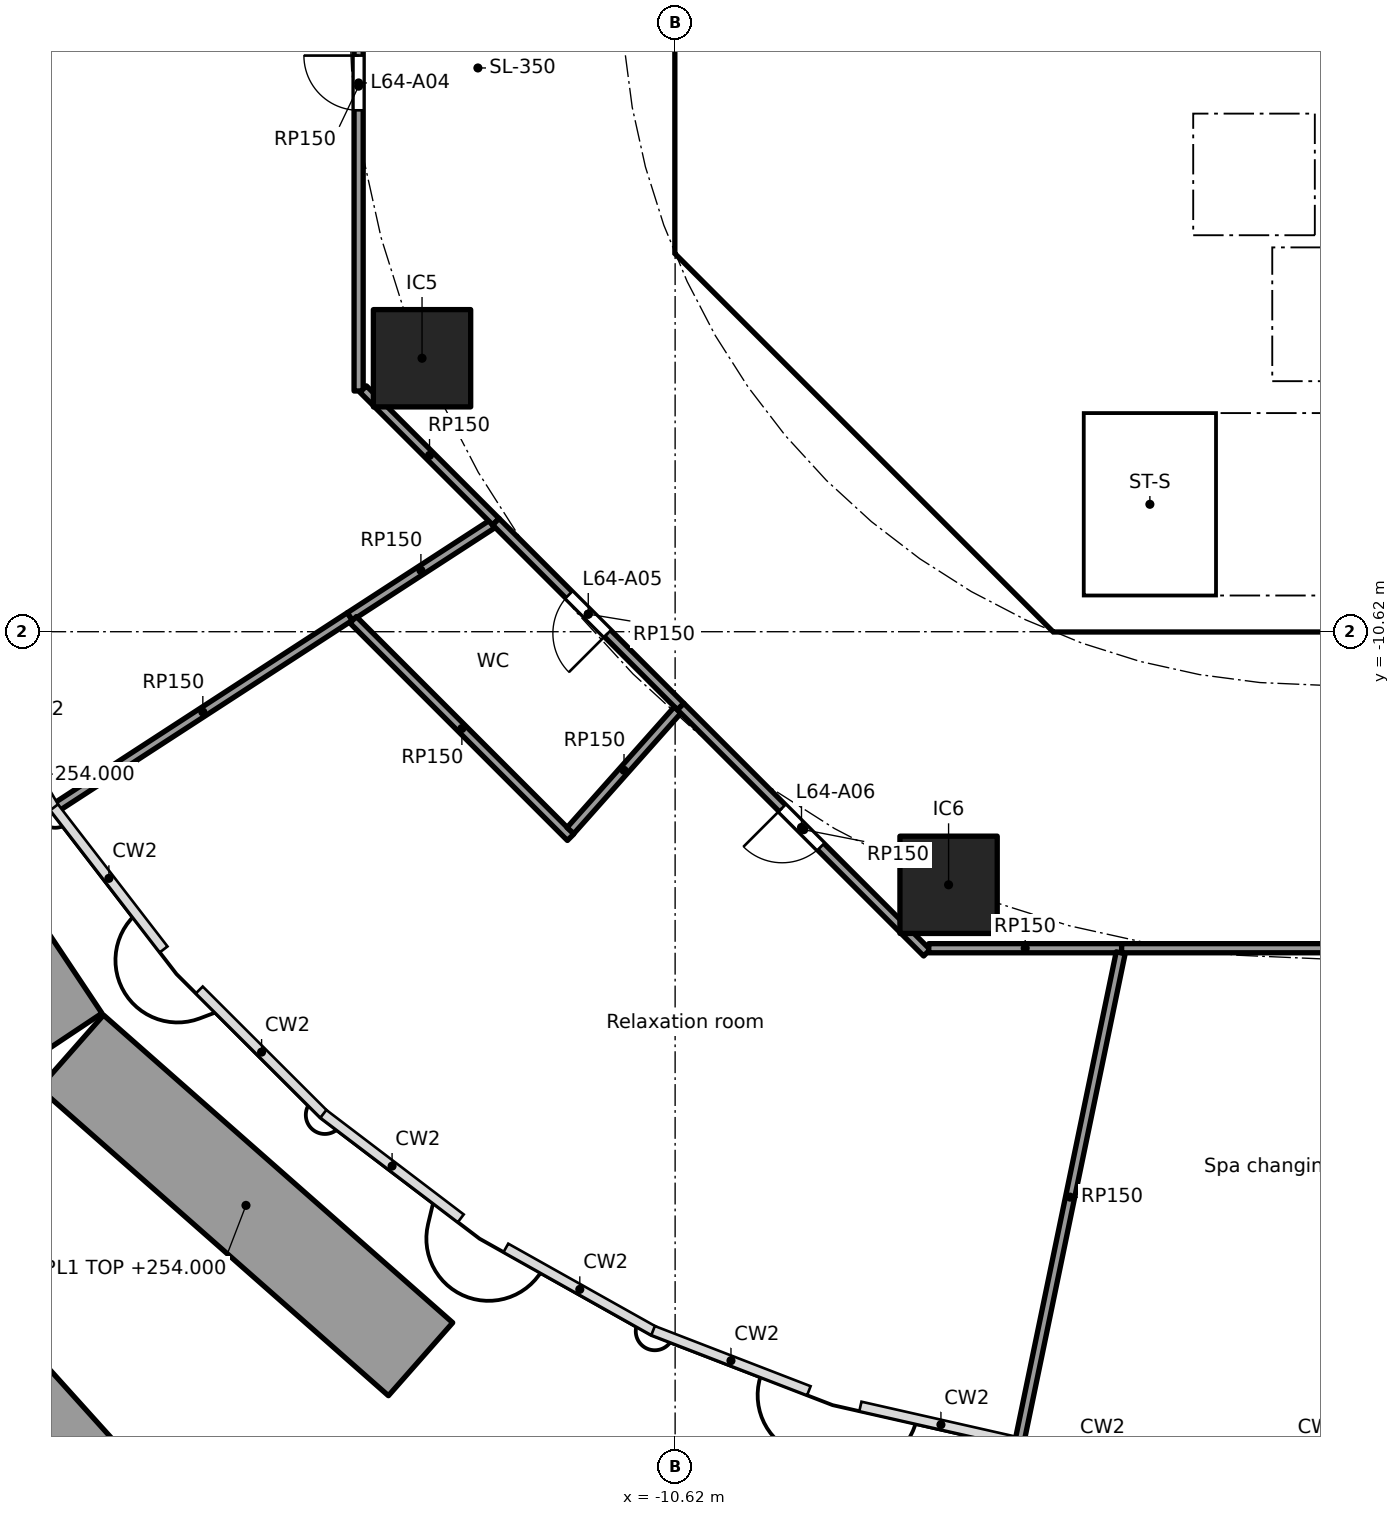
"""IFC4 building model, lengths in metres.
Left out: names, types, materials, properties, quantities, classifications, styles, units other than length and angle.
Written with IfcOpenShell. Run it as: python <this file> out.ifc"""

import sys

from ifc_helpers import new_model, si_unit, direction, frame, frame_2d, origin, origin_2d, place, context, subcontext, project, spatial, polyline, rectangle, outline, extrude, element, fill, save


model = new_model("IFC4")
c1 = context("Model", 3, precision=1e-05, world=origin(), true_north=direction((0.0, 1.0)))
c2 = subcontext(c1, "Body", "Model", "MODEL_VIEW")
j1 = project(units=[si_unit("LENGTHUNIT", "METRE"), si_unit("PLANEANGLEUNIT", "RADIAN")], contexts=[c1])
p1 = place(None, origin())
s1 = spatial("IfcSite", under=j1, at=p1, CompositionType="ELEMENT")
p2 = place(p1, origin())
s2 = spatial("IfcBuilding", under=s1, at=p2, CompositionType="ELEMENT")
p3 = place(p2, frame((0.0, 0.0, 252.9)))
s3 = spatial("IfcBuildingStorey", under=s2, at=p3, CompositionType="ELEMENT", Elevation=252.9)
for number, where, z_axis, x_axis in (
    (1, (-14.782, -6.123, 0.0), (0.0, 0.0, 1.0), (1.0, 0.0, 0.0)),
    (2, (-6.123, -14.782, 0.0), (0.0, 0.0, 1.0), (1.0, 0.0, 0.0)),
):
    element("IfcColumn", number, at=place(p3, frame(where, z_axis=z_axis, x_axis=x_axis)), inside=s3, PredefinedType="COLUMN", context=c2, shape_type="SweptSolid", body=[
        extrude(rectangle(XDim=1.6, YDim=1.6, at=origin_2d()), origin(), (0.0, 0.0, 1.0), 5.6),
    ])
p4 = place(p3, frame((-24.432, -11.757, 0.0), z_axis=(0.0, 0.0, 1.0), x_axis=(0.554641393293, -0.832089493291, 0.0)))
e3 = element("IfcWall", 3, at=p4, inside=s3, PredefinedType="SOLIDWALL", context=c2, shape_type="SweptSolid", body=[
    extrude(rectangle(XDim=6.707, YDim=1.6, at=frame_2d((3.354, 0.0))), origin(), (0.0, 0.0, 1.0), 1.1),
])
p5 = place(p3, frame((-20.549, -17.524, 0.0), z_axis=(0.0, 0.0, 1.0), x_axis=(0.75035522749, -0.66103481949, 0.0)))
e4 = element("IfcWall", 4, at=p5, inside=s3, PredefinedType="SOLIDWALL", context=c2, shape_type="SweptSolid", body=[
    extrude(rectangle(XDim=7.653, YDim=1.6, at=frame_2d((3.827, 0.0))), origin(), (0.0, 0.0, 1.0), 1.1),
])
p6 = place(p3, frame((-20.256, -24.668, 0.0), z_axis=(0.0, 0.0, 1.0), x_axis=(-0.669519037775, 0.742794896359, 0.0)))
e5 = element("IfcWall", 5, at=p6, inside=s3, PredefinedType="SOLIDWALL", context=c2, shape_type="SweptSolid", body=[
    extrude(rectangle(XDim=6.787, YDim=1.6, at=frame_2d((3.394, 0.0))), origin(), (0.0, 0.0, 1.0), 1.1),
])
p7 = place(p3, frame((-10.325, 3.801, 0.0), z_axis=(0.0, 0.0, 1.0), x_axis=(0.0, -1.0, 0.0)))
e6 = element("IfcWall", 6, at=p7, inside=s3, PredefinedType="SHEAR", context=c2, shape_type="SweptSolid", body=[
    extrude(rectangle(XDim=7.602, YDim=0.6, at=frame_2d((3.801, 0.0))), origin(), (0.0, 0.0, 1.0), 5.34),
])
p8 = place(p7, frame((0.651, 0.0, 0.0)))
e7 = element("IfcOpeningElement", 7, at=p8, cuts=e6, PredefinedType="OPENING", context=c2, shape_type="SweptSolid", body=[
    extrude(rectangle(XDim=1.5, YDim=2.1, at=frame_2d((0.75, 1.05))), frame((0.0, 0.31, 0.0), z_axis=(0.0, -1.0, 0.0), x_axis=(1.0, 0.0, 0.0)), (0.0, 0.0, 1.0), 0.62),
])
p9 = place(p7, frame((5.451, 0.0, 0.0)))
e8 = element("IfcOpeningElement", 8, at=p9, cuts=e6, PredefinedType="OPENING", context=c2, shape_type="SweptSolid", body=[
    extrude(rectangle(XDim=1.5, YDim=2.1, at=frame_2d((0.75, 1.05))), frame((0.0, 0.31, 0.0), z_axis=(0.0, -1.0, 0.0), x_axis=(1.0, 0.0, 0.0)), (0.0, 0.0, 1.0), 0.62),
])
p10 = place(p3, frame((-9.988, -4.613, 0.0), z_axis=(0.0, 0.0, 1.0), x_axis=(0.707106781187, -0.707106781187, 0.0)))
e9 = element("IfcWall", 9, at=p10, inside=s3, PredefinedType="SHEAR", context=c2, shape_type="SweptSolid", body=[
    extrude(rectangle(XDim=7.602, YDim=0.6, at=frame_2d((3.801, 0.0))), origin(), (0.0, 0.0, 1.0), 5.34),
])
p11 = place(p10, frame((6.151, 0.0, 0.0)))
e10 = element("IfcOpeningElement", 10, at=p11, cuts=e9, PredefinedType="OPENING", context=c2, shape_type="SweptSolid", body=[
    extrude(rectangle(XDim=1.1, YDim=2.1, at=frame_2d((0.55, 1.05))), frame((0.0, 0.31, 0.0), z_axis=(0.0, -1.0, 0.0), x_axis=(1.0, 0.0, 0.0)), (0.0, 0.0, 1.0), 0.62),
])
p12 = place(p3, frame((-6.6, -7.427, 0.0), z_axis=(0.0, 0.0, 1.0), x_axis=(0.0, 1.0, 0.0)))
e11 = element("IfcWall", 11, at=p12, inside=s3, PredefinedType="PARTITIONING", context=c2, shape_type="SweptSolid", body=[
    extrude(rectangle(XDim=3.127, YDim=0.15, at=frame_2d((1.563, 0.0))), origin(), (0.0, 0.0, 1.0), 5.34),
])
p13 = place(p12, frame((1.076, 0.0, 0.0)))
e12 = element("IfcOpeningElement", 12, at=p13, cuts=e11, PredefinedType="OPENING", context=c2, shape_type="SweptSolid", body=[
    extrude(rectangle(XDim=0.9, YDim=2.1, at=frame_2d((0.45, 1.05))), frame((0.0, 0.085, 0.0), z_axis=(0.0, -1.0, 0.0), x_axis=(1.0, 0.0, 0.0)), (0.0, 0.0, 1.0), 0.17),
])
p14 = place(p3, frame((-4.0, -6.5, 0.0), z_axis=(0.0, 0.0, 1.0), x_axis=(0.0, 1.0, 0.0)))
e13 = element("IfcWall", 13, at=p14, inside=s3, PredefinedType="SOLIDWALL", context=c2, shape_type="SweptSolid", body=[
    extrude(rectangle(XDim=2.2, YDim=0.2, at=frame_2d((1.1, 0.0))), origin(), (0.0, 0.0, 1.0), 5.34),
])
p15 = place(p14, frame((0.65, 0.0, 0.0)))
e14 = element("IfcOpeningElement", 14, at=p15, cuts=e13, PredefinedType="OPENING", context=c2, shape_type="SweptSolid", body=[
    extrude(rectangle(XDim=0.9, YDim=2.1, at=frame_2d((0.45, 1.05))), frame((0.0, 0.11, 0.0), z_axis=(0.0, -1.0, 0.0), x_axis=(1.0, 0.0, 0.0)), (0.0, 0.0, 1.0), 0.22),
])
p16 = place(p3, frame((-6.7, -2.0, 0.0), z_axis=(0.0, 0.0, 1.0), x_axis=(1.0, 0.0, 0.0)))
e15 = element("IfcWall", 15, at=p16, inside=s3, PredefinedType="SOLIDWALL", context=c2, shape_type="SweptSolid", body=[
    extrude(rectangle(XDim=13.4, YDim=0.2, at=frame_2d((6.7, 0.0))), origin(), (0.0, 0.0, 1.0), 5.34),
])
p17 = place(p16, frame((5.05, 0.0, 0.0)))
e16 = element("IfcOpeningElement", 16, at=p17, cuts=e15, PredefinedType="OPENING", context=c2, shape_type="SweptSolid", body=[
    extrude(rectangle(XDim=1.1, YDim=2.1, at=frame_2d((0.55, 1.05))), frame((0.0, 0.11, 0.0), z_axis=(0.0, -1.0, 0.0), x_axis=(1.0, 0.0, 0.0)), (0.0, 0.0, 1.0), 0.22),
])
p18 = place(p16, frame((7.25, 0.0, 0.0)))
e17 = element("IfcOpeningElement", 17, at=p18, cuts=e15, PredefinedType="OPENING", context=c2, shape_type="SweptSolid", body=[
    extrude(rectangle(XDim=1.1, YDim=2.1, at=frame_2d((0.55, 1.05))), frame((0.0, 0.11, 0.0), z_axis=(0.0, -1.0, 0.0), x_axis=(1.0, 0.0, 0.0)), (0.0, 0.0, 1.0), 0.22),
])
p19 = place(p16, frame((9.45, 0.0, 0.0)))
e18 = element("IfcOpeningElement", 18, at=p19, cuts=e15, PredefinedType="OPENING", context=c2, shape_type="SweptSolid", body=[
    extrude(rectangle(XDim=1.1, YDim=2.1, at=frame_2d((0.55, 1.05))), frame((0.0, 0.11, 0.0), z_axis=(0.0, -1.0, 0.0), x_axis=(1.0, 0.0, 0.0)), (0.0, 0.0, 1.0), 0.22),
])
p20 = place(p16, frame((11.65, 0.0, 0.0)))
e19 = element("IfcOpeningElement", 19, at=p20, cuts=e15, PredefinedType="OPENING", context=c2, shape_type="SweptSolid", body=[
    extrude(rectangle(XDim=1.1, YDim=2.1, at=frame_2d((0.55, 1.05))), frame((0.0, 0.11, 0.0), z_axis=(0.0, -1.0, 0.0), x_axis=(1.0, 0.0, 0.0)), (0.0, 0.0, 1.0), 0.22),
])
p21 = place(p16, frame((1.85, 0.0, 0.0)))
e20 = element("IfcOpeningElement", 20, at=p21, cuts=e15, PredefinedType="OPENING", context=c2, shape_type="SweptSolid", body=[
    extrude(rectangle(XDim=0.9, YDim=2.1, at=frame_2d((0.45, 1.05))), frame((0.0, 0.11, 0.0), z_axis=(0.0, -1.0, 0.0), x_axis=(1.0, 0.0, 0.0)), (0.0, 0.0, 1.0), 0.22),
])
p22 = place(p3, origin())
e21 = element("IfcWall", 21, at=p22, inside=s3, PredefinedType="SHEAR", context=c2, shape_type="SweptSolid", body=[
    extrude(outline(polyline([(-10.625, -3.801), (-10.025, -3.801), (-10.025, -4.152), (-9.776, -4.401), (-10.2, -4.825), (-10.625, -4.401), (-10.625, -3.801)])), origin(), (0.0, 0.0, 1.0), 5.34),
])
p23 = place(p3, origin())
e22 = element("IfcWall", 22, at=p23, inside=s3, PredefinedType="SHEAR", context=c2, shape_type="SweptSolid", body=[
    extrude(outline(polyline([(-4.152, -10.025), (4.152, -10.025), (4.401, -9.776), (4.825, -10.2), (4.401, -10.625), (-4.401, -10.625), (-4.825, -10.2), (-4.401, -9.776), (-4.152, -10.025)])), origin(), (0.0, 0.0, 1.0), 5.34),
])
p24 = place(p3, frame((-0.9, -6.5, 0.0), z_axis=(0.0, 0.0, 1.0), x_axis=(0.0, 1.0, 0.0)))
e23 = element("IfcWall", 23, at=p24, inside=s3, PredefinedType="SOLIDWALL", context=c2, shape_type="SweptSolid", body=[
    extrude(rectangle(XDim=2.2, YDim=0.2, at=frame_2d((1.1, 0.0))), origin(), (0.0, 0.0, 1.0), 5.34),
])
p25 = place(p3, origin())
e24 = element("IfcWall", 24, at=p25, inside=s3, PredefinedType="SOLIDWALL", context=c2, shape_type="SweptSolid", body=[
    extrude(outline(polyline([(-6.7, -2.1), (-6.5, -2.1), (-6.5, -4.1), (-2.3, -4.1), (-2.3, -2.1), (-2.1, -2.1), (-2.1, -4.1), (-0.1, -4.1), (-0.1, -2.1), (0.1, -2.1), (0.1, -4.1), (2.1, -4.1), (2.1, -2.1), (2.3, -2.1), (2.3, -4.1), (4.3, -4.1), (4.3, -2.1), (4.5, -2.1), (4.5, -4.1), (6.5, -4.1), (6.5, -2.1), (6.7, -2.1), (6.7, -4.3), (-6.7, -4.3), (-6.7, -2.1)])), origin(), (0.0, 0.0, 1.0), 5.34),
])
p26 = place(p3, frame((-10.025, -4.0, 0.0), z_axis=(0.0, 0.0, 1.0), x_axis=(1.0, 0.0, 0.0)))
e25 = element("IfcWall", 25, at=p26, inside=s3, PredefinedType="PARTITIONING", context=c2, shape_type="SweptSolid", body=[
    extrude(rectangle(XDim=3.325, YDim=0.2, at=frame_2d((1.662, 0.0))), origin(), (0.0, 0.0, 1.0), 5.34),
])
p27 = place(p3, origin())
e26 = element("IfcWall", 26, at=p27, inside=s3, PredefinedType="SOLIDWALL", context=c2, shape_type="SweptSolid", body=[
    extrude(outline(polyline([(-3.9, -10.025), (-4.1, -10.025), (-4.1, -7.025), (-3.9, -7.025), (-3.9, -10.025)])), origin(), (0.0, 0.0, 1.0), 5.34),
])
p28 = place(p3, origin())
e27 = element("IfcWall", 27, at=p28, inside=s3, PredefinedType="SOLIDWALL", context=c2, shape_type="SweptSolid", body=[
    extrude(outline(polyline([(4.1, -7.025), (-4.1, -7.025), (-4.1, -6.5), (4.1, -6.5), (4.1, -7.025)])), origin(), (0.0, 0.0, 1.0), 5.34),
])
p29 = place(p3, frame((-15.969, -10.37, 0.0), z_axis=(0.0, 0.0, 1.0), x_axis=(-0.838660232874, -0.544654949298, 0.0)))
e28 = element("IfcWall", 28, at=p29, inside=s3, PredefinedType="PARTITIONING", context=c2, shape_type="SweptSolid", body=[
    extrude(rectangle(XDim=5.766, YDim=0.15, at=frame_2d((2.883, 0.0))), origin(), (0.0, 0.0, 1.0), 5.34),
])
p30 = place(p3, frame((-15.825, -6.661, 0.0), z_axis=(0.0, 0.0, 1.0), x_axis=(0.0, 1.0, 0.0)))
e29 = element("IfcWall", 29, at=p30, inside=s3, PredefinedType="PARTITIONING", context=c2, shape_type="SweptSolid", body=[
    extrude(rectangle(XDim=10.025, YDim=0.15, at=frame_2d((5.013, 0.0))), origin(), (0.0, 0.0, 1.0), 5.34),
])
p31 = place(p30, frame((4.615, 0.0, 0.0)))
e30 = element("IfcOpeningElement", 30, at=p31, cuts=e29, PredefinedType="OPENING", context=c2, shape_type="SweptSolid", body=[
    extrude(rectangle(XDim=0.9, YDim=2.1, at=frame_2d((0.45, 1.05))), frame((0.0, 0.085, 0.0), z_axis=(0.0, -1.0, 0.0), x_axis=(1.0, 0.0, 0.0)), (0.0, 0.0, 1.0), 0.17),
])
p32 = place(p3, frame((-13.632, -8.853, 0.0), z_axis=(0.0, 0.0, 1.0), x_axis=(-0.838689782974, -0.544609445323, 0.0)))
e31 = element("IfcWall", 31, at=p32, inside=s3, PredefinedType="PARTITIONING", context=c2, shape_type="SweptSolid", body=[
    extrude(rectangle(XDim=2.786, YDim=0.15, at=frame_2d((1.393, 0.0))), origin(), (0.0, 0.0, 1.0), 5.34),
])
p33 = place(p3, frame((-13.568, -8.811, 0.0), z_axis=(0.0, 0.0, 1.0), x_axis=(-0.707225473048, 0.706988069398, 0.0)))
e32 = element("IfcWall", 32, at=p33, inside=s3, PredefinedType="PARTITIONING", context=c2, shape_type="SweptSolid", body=[
    extrude(rectangle(XDim=3.085, YDim=0.15, at=frame_2d((1.542, 0.0))), origin(), (0.0, 0.0, 1.0), 5.34),
])
p34 = place(p3, frame((-12.339, -14.0, 0.0), z_axis=(0.0, 0.0, 1.0), x_axis=(-0.707130919879, 0.70708264167, 0.0)))
e33 = element("IfcWall", 33, at=p34, inside=s3, PredefinedType="PARTITIONING", context=c2, shape_type="SweptSolid", body=[
    extrude(rectangle(XDim=5.057, YDim=0.15, at=frame_2d((2.528, 0.0))), origin(), (0.0, 0.0, 1.0), 5.34),
])
p35 = place(p3, frame((-10.529, -11.851, 0.0), z_axis=(0.0, 0.0, 1.0), x_axis=(-0.706993180613, 0.707220363512, 0.0)))
e34 = element("IfcWall", 34, at=p35, inside=s3, PredefinedType="PARTITIONING", context=c2, shape_type="SweptSolid", body=[
    extrude(rectangle(XDim=4.299, YDim=0.15, at=frame_2d((2.149, 0.0))), origin(), (0.0, 0.0, 1.0), 5.34),
])
p36 = place(p35, frame((1.699, 0.0, 0.0)))
e35 = element("IfcOpeningElement", 35, at=p36, cuts=e34, PredefinedType="OPENING", context=c2, shape_type="SweptSolid", body=[
    extrude(rectangle(XDim=0.9, YDim=2.1, at=frame_2d((0.45, 1.05))), frame((0.0, 0.085, 0.0), z_axis=(0.0, -1.0, 0.0), x_axis=(1.0, 0.0, 0.0)), (0.0, 0.0, 1.0), 0.17),
])
p37 = place(p3, frame((-10.579, -11.907, 0.0), z_axis=(0.0, 0.0, 1.0), x_axis=(-0.664352419293, -0.747419469227, 0.0)))
e36 = element("IfcWall", 36, at=p37, inside=s3, PredefinedType="PARTITIONING", context=c2, shape_type="SweptSolid", body=[
    extrude(rectangle(XDim=2.654, YDim=0.15, at=frame_2d((1.327, 0.0))), origin(), (0.0, 0.0, 1.0), 5.34),
])
p38 = place(p3, frame((-6.48, -15.9, 0.0), z_axis=(0.0, 0.0, 1.0), x_axis=(-0.707128099168, 0.707085462563, 0.0)))
e37 = element("IfcWall", 37, at=p38, inside=s3, PredefinedType="PARTITIONING", context=c2, shape_type="SweptSolid", body=[
    extrude(rectangle(XDim=5.726, YDim=0.15, at=frame_2d((2.863, 0.0))), origin(), (0.0, 0.0, 1.0), 5.34),
])
p39 = place(p38, frame((2.466, 0.0, 0.0)))
e38 = element("IfcOpeningElement", 38, at=p39, cuts=e37, PredefinedType="OPENING", context=c2, shape_type="SweptSolid", body=[
    extrude(rectangle(XDim=0.9, YDim=2.1, at=frame_2d((0.45, 1.05))), frame((0.0, 0.085, 0.0), z_axis=(0.0, -1.0, 0.0), x_axis=(1.0, 0.0, 0.0)), (0.0, 0.0, 1.0), 0.17),
])
p40 = place(p3, frame((-3.277, -15.825, 0.0), z_axis=(0.0, 0.0, 1.0), x_axis=(-1.0, 0.0, 0.0)))
e39 = element("IfcWall", 39, at=p40, inside=s3, PredefinedType="PARTITIONING", context=c2, shape_type="SweptSolid", body=[
    extrude(rectangle(XDim=3.172, YDim=0.15, at=frame_2d((1.586, 0.0))), origin(), (0.0, 0.0, 1.0), 5.34),
])
p41 = place(p3, frame((-3.292, -15.9, 0.0), z_axis=(0.0, 0.0, 1.0), x_axis=(-0.202759053946, -0.979228658712, 0.0)))
e40 = element("IfcWall", 40, at=p41, inside=s3, PredefinedType="PARTITIONING", context=c2, shape_type="SweptSolid", body=[
    extrude(rectangle(XDim=8.207, YDim=0.15, at=frame_2d((4.104, 0.0))), origin(), (0.0, 0.0, 1.0), 5.34),
])
p42 = place(p3, frame((6.661, -15.825, 0.0), z_axis=(0.0, 0.0, 1.0), x_axis=(-1.0, 0.0, 0.0)))
e41 = element("IfcWall", 41, at=p42, inside=s3, PredefinedType="PARTITIONING", context=c2, shape_type="SweptSolid", body=[
    extrude(rectangle(XDim=9.938, YDim=0.15, at=frame_2d((4.969, 0.0))), origin(), (0.0, 0.0, 1.0), 5.34),
])
p43 = place(p42, frame((4.422, 0.0, 0.0)))
e42 = element("IfcOpeningElement", 42, at=p43, cuts=e41, PredefinedType="OPENING", context=c2, shape_type="SweptSolid", body=[
    extrude(rectangle(XDim=1.2, YDim=2.1, at=frame_2d((0.6, 1.05))), frame((0.0, 0.085, 0.0), z_axis=(0.0, -1.0, 0.0), x_axis=(1.0, 0.0, 0.0)), (0.0, 0.0, 1.0), 0.17),
])
p44 = place(p17, origin())
e43 = element("IfcDoor", 43, at=p44, inside=s3, OperationType="DOUBLE_DOOR_SLIDING", PredefinedType="DOOR", context=c2, shape_type="SweptSolid", body=[
    extrude(rectangle(XDim=1.1, YDim=2.1, at=frame_2d((0.55, 1.05))), frame((0.0, 0.025, 0.0), z_axis=(0.0, -1.0, 0.0), x_axis=(1.0, 0.0, 0.0)), (0.0, 0.0, 1.0), 0.05),
])
fill(e16, e43)
p45 = place(p13, origin())
e44 = element("IfcDoor", 44, at=p45, inside=s3, OperationType="SINGLE_SWING_RIGHT", PredefinedType="DOOR", context=c2, shape_type="SweptSolid", body=[
    extrude(rectangle(XDim=0.9, YDim=2.1, at=frame_2d((0.45, 1.05))), frame((0.0, 0.025, 0.0), z_axis=(0.0, -1.0, 0.0), x_axis=(1.0, 0.0, 0.0)), (0.0, 0.0, 1.0), 0.05),
])
fill(e12, e44)
p46 = place(p15, frame((0.9, 0.0, 0.0), x_axis=(-1.0, 0.0, 0.0)))
e45 = element("IfcDoor", 45, at=p46, inside=s3, OperationType="SINGLE_SWING_LEFT", PredefinedType="DOOR", context=c2, shape_type="SweptSolid", body=[
    extrude(rectangle(XDim=0.9, YDim=2.1, at=frame_2d((0.45, 1.05))), frame((0.0, 0.025, 0.0), z_axis=(0.0, -1.0, 0.0), x_axis=(1.0, 0.0, 0.0)), (0.0, 0.0, 1.0), 0.05),
])
fill(e14, e45)
p47 = place(p21, frame((0.9, 0.0, 0.0), x_axis=(-1.0, 0.0, 0.0)))
e46 = element("IfcDoor", 46, at=p47, inside=s3, OperationType="SINGLE_SWING_RIGHT", PredefinedType="DOOR", context=c2, shape_type="SweptSolid", body=[
    extrude(rectangle(XDim=0.9, YDim=2.1, at=frame_2d((0.45, 1.05))), frame((0.0, 0.025, 0.0), z_axis=(0.0, -1.0, 0.0), x_axis=(1.0, 0.0, 0.0)), (0.0, 0.0, 1.0), 0.05),
])
fill(e20, e46)
p48 = place(p9, origin())
e47 = element("IfcDoor", 47, at=p48, inside=s3, OperationType="DOUBLE_DOOR_SINGLE_SWING", PredefinedType="DOOR", context=c2, shape_type="SweptSolid", body=[
    extrude(rectangle(XDim=1.5, YDim=2.1, at=frame_2d((0.75, 1.05))), frame((0.0, 0.025, 0.0), z_axis=(0.0, -1.0, 0.0), x_axis=(1.0, 0.0, 0.0)), (0.0, 0.0, 1.0), 0.05),
])
fill(e8, e47)
p49 = place(p11, origin())
e48 = element("IfcDoor", 48, at=p49, inside=s3, OperationType="SINGLE_SWING_LEFT", PredefinedType="DOOR", context=c2, shape_type="SweptSolid", body=[
    extrude(rectangle(XDim=1.1, YDim=2.1, at=frame_2d((0.55, 1.05))), frame((0.0, 0.025, 0.0), z_axis=(0.0, -1.0, 0.0), x_axis=(1.0, 0.0, 0.0)), (0.0, 0.0, 1.0), 0.05),
])
fill(e10, e48)
p50 = place(p31, origin())
e49 = element("IfcDoor", 49, at=p50, inside=s3, OperationType="SINGLE_SWING_RIGHT", PredefinedType="DOOR", context=c2, shape_type="SweptSolid", body=[
    extrude(rectangle(XDim=0.9, YDim=2.1, at=frame_2d((0.45, 1.05))), frame((0.0, 0.025, 0.0), z_axis=(0.0, -1.0, 0.0), x_axis=(1.0, 0.0, 0.0)), (0.0, 0.0, 1.0), 0.05),
])
fill(e30, e49)
p51 = place(p36, origin())
e50 = element("IfcDoor", 50, at=p51, inside=s3, OperationType="SINGLE_SWING_LEFT", PredefinedType="DOOR", context=c2, shape_type="SweptSolid", body=[
    extrude(rectangle(XDim=0.9, YDim=2.1, at=frame_2d((0.45, 1.05))), frame((0.0, 0.025, 0.0), z_axis=(0.0, -1.0, 0.0), x_axis=(1.0, 0.0, 0.0)), (0.0, 0.0, 1.0), 0.05),
])
fill(e35, e50)
p52 = place(p39, origin())
e51 = element("IfcDoor", 51, at=p52, inside=s3, OperationType="SINGLE_SWING_RIGHT", PredefinedType="DOOR", context=c2, shape_type="SweptSolid", body=[
    extrude(rectangle(XDim=0.9, YDim=2.1, at=frame_2d((0.45, 1.05))), frame((0.0, 0.025, 0.0), z_axis=(0.0, -1.0, 0.0), x_axis=(1.0, 0.0, 0.0)), (0.0, 0.0, 1.0), 0.05),
])
fill(e38, e51)
save(model, sys.argv[1])
